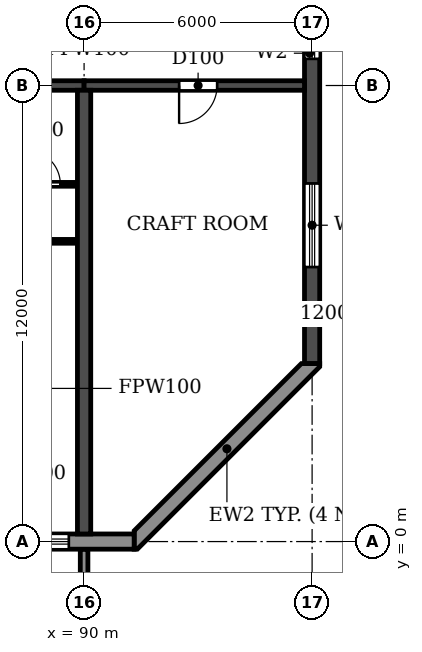
"""IFC4 building model, lengths in metres.
Left out: names, types, materials, properties, quantities, classifications, styles, units other than length and angle.
Written with IfcOpenShell. Run it as: python <this file> out.ifc"""

import sys

from ifc_helpers import new_model, si_unit, direction, frame, frame_2d, origin, place, context, subcontext, project, spatial, polyline, rectangle, outline, extrude, source, transform, mapped, element, fill, save


model = new_model("IFC4")
c1 = context("Model", 3, precision=1e-05, world=origin(), true_north=direction((0.0, 1.0)))
c2 = subcontext(c1, "Body", "Model", "MODEL_VIEW")
j1 = project(units=[si_unit("LENGTHUNIT", "METRE"), si_unit("PLANEANGLEUNIT", "RADIAN")], contexts=[c1])
p1 = place(None, origin())
s1 = spatial("IfcSite", under=j1, at=p1, CompositionType="ELEMENT")
p2 = place(p1, origin())
s2 = spatial("IfcBuilding", under=s1, at=p2, CompositionType="ELEMENT")
p3 = place(p2, frame((0.0, 0.0, 82.8)))
s3 = spatial("IfcBuildingStorey", under=s2, at=p3, CompositionType="ELEMENT", Elevation=82.8)
p4 = place(p3, frame((90.0, 0.2, 0.0), z_axis=(0.0, 0.0, 1.0), x_axis=(0.0, 1.0, 0.0)))
e1 = element("IfcWall", 1, at=p4, inside=s3, PredefinedType="SHEAR", context=c2, shape_type="SweptSolid", body=[
    extrude(rectangle(XDim=11.675, YDim=0.35, at=frame_2d((5.837, 0.0))), origin(), (0.0, 0.0, 1.0), 3.06),
])
p5 = place(p3, frame((96.0, 4.683, 0.0), z_axis=(0.0, 0.0, 1.0), x_axis=(0.0, 1.0, 0.0)))
e2 = element("IfcWall", 2, at=p5, inside=s3, PredefinedType="SHEAR", context=c2, shape_type="SweptSolid", body=[
    extrude(rectangle(XDim=34.234, YDim=0.4, at=frame_2d((17.117, 0.0))), origin(), (0.0, 0.0, 1.0), 3.06),
])
p6 = place(p5, frame((15.917, 0.0, 0.9)))
e3 = element("IfcOpeningElement", 3, at=p6, cuts=e2, PredefinedType="OPENING", context=c2, shape_type="SweptSolid", body=[
    extrude(rectangle(XDim=1.2, YDim=1.5, at=frame_2d((0.6, 0.75))), frame((0.0, 0.21, 0.0), z_axis=(0.0, -1.0, 0.0), x_axis=(1.0, 0.0, 0.0)), (0.0, 0.0, 1.0), 0.42),
])
p7 = place(p5, frame((23.817, 0.0, 0.9)))
e4 = element("IfcOpeningElement", 4, at=p7, cuts=e2, PredefinedType="OPENING", context=c2, shape_type="SweptSolid", body=[
    extrude(rectangle(XDim=1.2, YDim=1.5, at=frame_2d((0.6, 0.75))), frame((0.0, 0.21, 0.0), z_axis=(0.0, -1.0, 0.0), x_axis=(1.0, 0.0, 0.0)), (0.0, 0.0, 1.0), 0.42),
])
p8 = place(p5, frame((8.017, 0.0, 0.9)))
e5 = element("IfcOpeningElement", 5, at=p8, cuts=e2, PredefinedType="OPENING", context=c2, shape_type="SweptSolid", body=[
    extrude(rectangle(XDim=1.2, YDim=1.5, at=frame_2d((0.6, 0.75))), frame((0.0, 0.21, 0.0), z_axis=(0.0, -1.0, 0.0), x_axis=(1.0, 0.0, 0.0)), (0.0, 0.0, 1.0), 0.42),
])
p9 = place(p5, frame((28.894, 0.0, 0.6)))
e6 = element("IfcOpeningElement", 6, at=p9, cuts=e2, PredefinedType="OPENING", context=c2, shape_type="SweptSolid", body=[
    extrude(rectangle(XDim=2.2, YDim=1.8, at=frame_2d((1.1, 0.9))), frame((0.0, 0.21, 0.0), z_axis=(0.0, -1.0, 0.0), x_axis=(1.0, 0.0, 0.0)), (0.0, 0.0, 1.0), 0.42),
])
p10 = place(p5, frame((2.541, 0.0, 0.6)))
e7 = element("IfcOpeningElement", 7, at=p10, cuts=e2, PredefinedType="OPENING", context=c2, shape_type="SweptSolid", body=[
    extrude(rectangle(XDim=2.2, YDim=1.8, at=frame_2d((1.1, 0.9))), frame((0.0, 0.21, 0.0), z_axis=(0.0, -1.0, 0.0), x_axis=(1.0, 0.0, 0.0)), (0.0, 0.0, 1.0), 0.42),
])
p11 = place(p3, frame((84.0, 12.0, 0.0), z_axis=(0.0, 0.0, 1.0), x_axis=(1.0, 0.0, 0.0)))
e8 = element("IfcWall", 8, at=p11, inside=s3, PredefinedType="SHEAR", context=c2, shape_type="SweptSolid", body=[
    extrude(rectangle(XDim=6.0, YDim=0.25, at=frame_2d((3.0, 0.0))), origin(), (0.0, 0.0, 1.0), 2.46),
])
p12 = place(p11, frame((2.45, 0.0, 0.0)))
e9 = element("IfcOpeningElement", 9, at=p12, cuts=e8, PredefinedType="OPENING", context=c2, shape_type="SweptSolid", body=[
    extrude(rectangle(XDim=1.0, YDim=2.1, at=frame_2d((0.5, 1.05))), frame((0.0, 0.135, 0.0), z_axis=(0.0, -1.0, 0.0), x_axis=(1.0, 0.0, 0.0)), (0.0, 0.0, 1.0), 0.27),
])
p13 = place(p3, frame((90.0, 12.0, 0.0), z_axis=(0.0, 0.0, 1.0), x_axis=(1.0, 0.0, 0.0)))
e10 = element("IfcWall", 10, at=p13, inside=s3, PredefinedType="SHEAR", context=c2, shape_type="SweptSolid", body=[
    extrude(rectangle(XDim=5.8, YDim=0.25, at=frame_2d((2.9, 0.0))), origin(), (0.0, 0.0, 1.0), 2.46),
])
p14 = place(p13, frame((2.5, 0.0, 0.0)))
e11 = element("IfcOpeningElement", 11, at=p14, cuts=e10, PredefinedType="OPENING", context=c2, shape_type="SweptSolid", body=[
    extrude(rectangle(XDim=1.0, YDim=2.1, at=frame_2d((0.5, 1.05))), frame((0.0, 0.135, 0.0), z_axis=(0.0, -1.0, 0.0), x_axis=(1.0, 0.0, 0.0)), (0.0, 0.0, 1.0), 0.27),
])
p15 = place(p3, frame((10.683, 0.0, 0.0), z_axis=(0.0, 0.0, 1.0), x_axis=(1.0, 0.0, 0.0)))
e12 = element("IfcWall", 12, at=p15, inside=s3, PredefinedType="STANDARD", context=c2, shape_type="SweptSolid", body=[
    extrude(rectangle(XDim=80.634, YDim=0.4, at=frame_2d((40.317, 0.0))), origin(), (0.0, 0.0, 1.0), 3.06),
])
p16 = place(p15, frame((1.717, 0.0, 0.9)))
e13 = element("IfcOpeningElement", 13, at=p16, cuts=e12, PredefinedType="OPENING", context=c2, shape_type="SweptSolid", body=[
    extrude(rectangle(XDim=2.2, YDim=1.5, at=frame_2d((1.1, 0.75))), frame((0.0, 0.21, 0.0), z_axis=(0.0, -1.0, 0.0), x_axis=(1.0, 0.0, 0.0)), (0.0, 0.0, 1.0), 0.42),
])
p17 = place(p15, frame((4.917, 0.0, 0.0)))
e14 = element("IfcOpeningElement", 14, at=p17, cuts=e12, PredefinedType="OPENING", context=c2, shape_type="SweptSolid", body=[
    extrude(rectangle(XDim=1.8, YDim=2.4, at=frame_2d((0.9, 1.2))), frame((0.0, 0.21, 0.0), z_axis=(0.0, -1.0, 0.0), x_axis=(1.0, 0.0, 0.0)), (0.0, 0.0, 1.0), 0.42),
])
p18 = place(p15, frame((7.717, 0.0, 0.9)))
e15 = element("IfcOpeningElement", 15, at=p18, cuts=e12, PredefinedType="OPENING", context=c2, shape_type="SweptSolid", body=[
    extrude(rectangle(XDim=2.2, YDim=1.5, at=frame_2d((1.1, 0.75))), frame((0.0, 0.21, 0.0), z_axis=(0.0, -1.0, 0.0), x_axis=(1.0, 0.0, 0.0)), (0.0, 0.0, 1.0), 0.42),
])
p19 = place(p15, frame((10.717, 0.0, 0.9)))
e16 = element("IfcOpeningElement", 16, at=p19, cuts=e12, PredefinedType="OPENING", context=c2, shape_type="SweptSolid", body=[
    extrude(rectangle(XDim=2.2, YDim=1.5, at=frame_2d((1.1, 0.75))), frame((0.0, 0.21, 0.0), z_axis=(0.0, -1.0, 0.0), x_axis=(1.0, 0.0, 0.0)), (0.0, 0.0, 1.0), 0.42),
])
p20 = place(p15, frame((13.917, 0.0, 0.0)))
e17 = element("IfcOpeningElement", 17, at=p20, cuts=e12, PredefinedType="OPENING", context=c2, shape_type="SweptSolid", body=[
    extrude(rectangle(XDim=1.8, YDim=2.4, at=frame_2d((0.9, 1.2))), frame((0.0, 0.21, 0.0), z_axis=(0.0, -1.0, 0.0), x_axis=(1.0, 0.0, 0.0)), (0.0, 0.0, 1.0), 0.42),
])
p21 = place(p15, frame((16.717, 0.0, 0.9)))
e18 = element("IfcOpeningElement", 18, at=p21, cuts=e12, PredefinedType="OPENING", context=c2, shape_type="SweptSolid", body=[
    extrude(rectangle(XDim=2.2, YDim=1.5, at=frame_2d((1.1, 0.75))), frame((0.0, 0.21, 0.0), z_axis=(0.0, -1.0, 0.0), x_axis=(1.0, 0.0, 0.0)), (0.0, 0.0, 1.0), 0.42),
])
p22 = place(p15, frame((19.717, 0.0, 0.9)))
e19 = element("IfcOpeningElement", 19, at=p22, cuts=e12, PredefinedType="OPENING", context=c2, shape_type="SweptSolid", body=[
    extrude(rectangle(XDim=2.2, YDim=1.5, at=frame_2d((1.1, 0.75))), frame((0.0, 0.21, 0.0), z_axis=(0.0, -1.0, 0.0), x_axis=(1.0, 0.0, 0.0)), (0.0, 0.0, 1.0), 0.42),
])
p23 = place(p15, frame((22.717, 0.0, 0.9)))
e20 = element("IfcOpeningElement", 20, at=p23, cuts=e12, PredefinedType="OPENING", context=c2, shape_type="SweptSolid", body=[
    extrude(rectangle(XDim=2.2, YDim=1.5, at=frame_2d((1.1, 0.75))), frame((0.0, 0.21, 0.0), z_axis=(0.0, -1.0, 0.0), x_axis=(1.0, 0.0, 0.0)), (0.0, 0.0, 1.0), 0.42),
])
p24 = place(p15, frame((25.917, 0.0, 0.0)))
e21 = element("IfcOpeningElement", 21, at=p24, cuts=e12, PredefinedType="OPENING", context=c2, shape_type="SweptSolid", body=[
    extrude(rectangle(XDim=1.8, YDim=2.4, at=frame_2d((0.9, 1.2))), frame((0.0, 0.21, 0.0), z_axis=(0.0, -1.0, 0.0), x_axis=(1.0, 0.0, 0.0)), (0.0, 0.0, 1.0), 0.42),
])
p25 = place(p15, frame((28.717, 0.0, 0.9)))
e22 = element("IfcOpeningElement", 22, at=p25, cuts=e12, PredefinedType="OPENING", context=c2, shape_type="SweptSolid", body=[
    extrude(rectangle(XDim=2.2, YDim=1.5, at=frame_2d((1.1, 0.75))), frame((0.0, 0.21, 0.0), z_axis=(0.0, -1.0, 0.0), x_axis=(1.0, 0.0, 0.0)), (0.0, 0.0, 1.0), 0.42),
])
p26 = place(p15, frame((31.717, 0.0, 0.9)))
e23 = element("IfcOpeningElement", 23, at=p26, cuts=e12, PredefinedType="OPENING", context=c2, shape_type="SweptSolid", body=[
    extrude(rectangle(XDim=2.2, YDim=1.5, at=frame_2d((1.1, 0.75))), frame((0.0, 0.21, 0.0), z_axis=(0.0, -1.0, 0.0), x_axis=(1.0, 0.0, 0.0)), (0.0, 0.0, 1.0), 0.42),
])
p27 = place(p15, frame((34.717, 0.0, 0.9)))
e24 = element("IfcOpeningElement", 24, at=p27, cuts=e12, PredefinedType="OPENING", context=c2, shape_type="SweptSolid", body=[
    extrude(rectangle(XDim=2.2, YDim=1.5, at=frame_2d((1.1, 0.75))), frame((0.0, 0.21, 0.0), z_axis=(0.0, -1.0, 0.0), x_axis=(1.0, 0.0, 0.0)), (0.0, 0.0, 1.0), 0.42),
])
p28 = place(p15, frame((37.717, 0.0, 0.9)))
e25 = element("IfcOpeningElement", 25, at=p28, cuts=e12, PredefinedType="OPENING", context=c2, shape_type="SweptSolid", body=[
    extrude(rectangle(XDim=2.2, YDim=1.5, at=frame_2d((1.1, 0.75))), frame((0.0, 0.21, 0.0), z_axis=(0.0, -1.0, 0.0), x_axis=(1.0, 0.0, 0.0)), (0.0, 0.0, 1.0), 0.42),
])
p29 = place(p15, frame((40.917, 0.0, 0.0)))
e26 = element("IfcOpeningElement", 26, at=p29, cuts=e12, PredefinedType="OPENING", context=c2, shape_type="SweptSolid", body=[
    extrude(rectangle(XDim=1.8, YDim=2.4, at=frame_2d((0.9, 1.2))), frame((0.0, 0.21, 0.0), z_axis=(0.0, -1.0, 0.0), x_axis=(1.0, 0.0, 0.0)), (0.0, 0.0, 1.0), 0.42),
])
p30 = place(p15, frame((43.717, 0.0, 0.9)))
e27 = element("IfcOpeningElement", 27, at=p30, cuts=e12, PredefinedType="OPENING", context=c2, shape_type="SweptSolid", body=[
    extrude(rectangle(XDim=2.2, YDim=1.5, at=frame_2d((1.1, 0.75))), frame((0.0, 0.21, 0.0), z_axis=(0.0, -1.0, 0.0), x_axis=(1.0, 0.0, 0.0)), (0.0, 0.0, 1.0), 0.42),
])
p31 = place(p15, frame((46.717, 0.0, 0.9)))
e28 = element("IfcOpeningElement", 28, at=p31, cuts=e12, PredefinedType="OPENING", context=c2, shape_type="SweptSolid", body=[
    extrude(rectangle(XDim=2.2, YDim=1.5, at=frame_2d((1.1, 0.75))), frame((0.0, 0.21, 0.0), z_axis=(0.0, -1.0, 0.0), x_axis=(1.0, 0.0, 0.0)), (0.0, 0.0, 1.0), 0.42),
])
p32 = place(p15, frame((49.717, 0.0, 0.9)))
e29 = element("IfcOpeningElement", 29, at=p32, cuts=e12, PredefinedType="OPENING", context=c2, shape_type="SweptSolid", body=[
    extrude(rectangle(XDim=2.2, YDim=1.5, at=frame_2d((1.1, 0.75))), frame((0.0, 0.21, 0.0), z_axis=(0.0, -1.0, 0.0), x_axis=(1.0, 0.0, 0.0)), (0.0, 0.0, 1.0), 0.42),
])
p33 = place(p15, frame((52.917, 0.0, 0.0)))
e30 = element("IfcOpeningElement", 30, at=p33, cuts=e12, PredefinedType="OPENING", context=c2, shape_type="SweptSolid", body=[
    extrude(rectangle(XDim=1.8, YDim=2.4, at=frame_2d((0.9, 1.2))), frame((0.0, 0.21, 0.0), z_axis=(0.0, -1.0, 0.0), x_axis=(1.0, 0.0, 0.0)), (0.0, 0.0, 1.0), 0.42),
])
p34 = place(p15, frame((55.717, 0.0, 0.9)))
e31 = element("IfcOpeningElement", 31, at=p34, cuts=e12, PredefinedType="OPENING", context=c2, shape_type="SweptSolid", body=[
    extrude(rectangle(XDim=2.2, YDim=1.5, at=frame_2d((1.1, 0.75))), frame((0.0, 0.21, 0.0), z_axis=(0.0, -1.0, 0.0), x_axis=(1.0, 0.0, 0.0)), (0.0, 0.0, 1.0), 0.42),
])
p35 = place(p15, frame((58.717, 0.0, 0.9)))
e32 = element("IfcOpeningElement", 32, at=p35, cuts=e12, PredefinedType="OPENING", context=c2, shape_type="SweptSolid", body=[
    extrude(rectangle(XDim=2.2, YDim=1.5, at=frame_2d((1.1, 0.75))), frame((0.0, 0.21, 0.0), z_axis=(0.0, -1.0, 0.0), x_axis=(1.0, 0.0, 0.0)), (0.0, 0.0, 1.0), 0.42),
])
p36 = place(p15, frame((61.717, 0.0, 0.9)))
e33 = element("IfcOpeningElement", 33, at=p36, cuts=e12, PredefinedType="OPENING", context=c2, shape_type="SweptSolid", body=[
    extrude(rectangle(XDim=2.2, YDim=1.5, at=frame_2d((1.1, 0.75))), frame((0.0, 0.21, 0.0), z_axis=(0.0, -1.0, 0.0), x_axis=(1.0, 0.0, 0.0)), (0.0, 0.0, 1.0), 0.42),
])
p37 = place(p15, frame((64.917, 0.0, 0.0)))
e34 = element("IfcOpeningElement", 34, at=p37, cuts=e12, PredefinedType="OPENING", context=c2, shape_type="SweptSolid", body=[
    extrude(rectangle(XDim=1.8, YDim=2.4, at=frame_2d((0.9, 1.2))), frame((0.0, 0.21, 0.0), z_axis=(0.0, -1.0, 0.0), x_axis=(1.0, 0.0, 0.0)), (0.0, 0.0, 1.0), 0.42),
])
p38 = place(p15, frame((67.717, 0.0, 0.9)))
e35 = element("IfcOpeningElement", 35, at=p38, cuts=e12, PredefinedType="OPENING", context=c2, shape_type="SweptSolid", body=[
    extrude(rectangle(XDim=2.2, YDim=1.5, at=frame_2d((1.1, 0.75))), frame((0.0, 0.21, 0.0), z_axis=(0.0, -1.0, 0.0), x_axis=(1.0, 0.0, 0.0)), (0.0, 0.0, 1.0), 0.42),
])
p39 = place(p15, frame((70.717, 0.0, 0.9)))
e36 = element("IfcOpeningElement", 36, at=p39, cuts=e12, PredefinedType="OPENING", context=c2, shape_type="SweptSolid", body=[
    extrude(rectangle(XDim=2.2, YDim=1.5, at=frame_2d((1.1, 0.75))), frame((0.0, 0.21, 0.0), z_axis=(0.0, -1.0, 0.0), x_axis=(1.0, 0.0, 0.0)), (0.0, 0.0, 1.0), 0.42),
])
p40 = place(p15, frame((73.917, 0.0, 0.0)))
e37 = element("IfcOpeningElement", 37, at=p40, cuts=e12, PredefinedType="OPENING", context=c2, shape_type="SweptSolid", body=[
    extrude(rectangle(XDim=1.8, YDim=2.4, at=frame_2d((0.9, 1.2))), frame((0.0, 0.21, 0.0), z_axis=(0.0, -1.0, 0.0), x_axis=(1.0, 0.0, 0.0)), (0.0, 0.0, 1.0), 0.42),
])
p41 = place(p15, frame((76.717, 0.0, 0.9)))
e38 = element("IfcOpeningElement", 38, at=p41, cuts=e12, PredefinedType="OPENING", context=c2, shape_type="SweptSolid", body=[
    extrude(rectangle(XDim=2.2, YDim=1.5, at=frame_2d((1.1, 0.75))), frame((0.0, 0.21, 0.0), z_axis=(0.0, -1.0, 0.0), x_axis=(1.0, 0.0, 0.0)), (0.0, 0.0, 1.0), 0.42),
])
p42 = place(p3, origin())
e39 = element("IfcWall", 39, at=p42, inside=s3, PredefinedType="STANDARD", context=c2, shape_type="SweptSolid", body=[
    extrude(outline(polyline([(91.317, -0.2), (91.4, -0.2), (96.2, 4.6), (96.2, 4.683), (95.717, 4.683), (91.317, 0.283), (91.317, -0.2)])), origin(), (0.0, 0.0, 1.0), 3.06),
])
m1 = source(origin(), c2, "Body", "SweptSolid", [
    extrude(outline(polyline([(0.0, 0.0), (0.2, 0.0), (0.2, 1.65), (0.0, 1.65), (0.0, 0.0)])), origin(), (0.0, 0.0, 1.0), 3.1),
])
p43 = place(p3, frame((89.9, -1.85, 0.0)))
e40 = element("IfcWall", 40, at=p43, inside=s3, PredefinedType="STANDARD", context=c2, shape_type="MappedRepresentation", body=[
    mapped(m1, transform((0.0, 0.0, 0.0))),
])
p44 = place(p3, frame((86.95, 7.9, 0.0), z_axis=(0.0, 0.0, 1.0), x_axis=(1.0, 0.0, 0.0)))
e41 = element("IfcWall", 41, at=p44, inside=s3, PredefinedType="PARTITIONING", context=c2, shape_type="SweptSolid", body=[
    extrude(rectangle(XDim=2.865, YDim=0.1, at=frame_2d((1.433, 0.0))), origin(), (0.0, 0.0, 1.0), 3.06),
])
p45 = place(p44, frame((0.55, 0.0, 0.0)))
e42 = element("IfcOpeningElement", 42, at=p45, cuts=e41, PredefinedType="OPENING", context=c2, shape_type="SweptSolid", body=[
    extrude(rectangle(XDim=0.9, YDim=2.1, at=frame_2d((0.45, 1.05))), frame((0.0, 0.06, 0.0), z_axis=(0.0, -1.0, 0.0), x_axis=(1.0, 0.0, 0.0)), (0.0, 0.0, 1.0), 0.12),
])
p46 = place(p3, frame((87.8, 9.4, 0.0), z_axis=(0.0, 0.0, 1.0), x_axis=(1.0, 0.0, 0.0)))
e43 = element("IfcWall", 43, at=p46, inside=s3, PredefinedType="PARTITIONING", context=c2, shape_type="SweptSolid", body=[
    extrude(rectangle(XDim=2.015, YDim=0.1, at=frame_2d((1.007, 0.0))), origin(), (0.0, 0.0, 1.0), 3.06),
])
p47 = place(p46, frame((0.675, 0.0, 0.0)))
e44 = element("IfcOpeningElement", 44, at=p47, cuts=e43, PredefinedType="OPENING", context=c2, shape_type="SweptSolid", body=[
    extrude(rectangle(XDim=0.9, YDim=2.1, at=frame_2d((0.45, 1.05))), frame((0.0, 0.06, 0.0), z_axis=(0.0, -1.0, 0.0), x_axis=(1.0, 0.0, 0.0)), (0.0, 0.0, 1.0), 0.12),
])
p48 = place(p41, origin())
e45 = element("IfcWindow", 45, at=p48, inside=s3, PartitioningType="DOUBLE_PANEL_HORIZONTAL", PredefinedType="WINDOW", context=c2, shape_type="SweptSolid", body=[
    extrude(rectangle(XDim=2.2, YDim=1.5, at=frame_2d((1.1, 0.75))), frame((0.0, 0.03, 0.0), z_axis=(0.0, -1.0, 0.0), x_axis=(1.0, 0.0, 0.0)), (0.0, 0.0, 1.0), 0.06),
])
fill(e38, e45)
p49 = place(p8, origin())
e46 = element("IfcWindow", 46, at=p49, inside=s3, PartitioningType="SINGLE_PANEL", PredefinedType="WINDOW", context=c2, shape_type="SweptSolid", body=[
    extrude(rectangle(XDim=1.2, YDim=1.5, at=frame_2d((0.6, 0.75))), frame((0.0, 0.03, 0.0), z_axis=(0.0, -1.0, 0.0), x_axis=(1.0, 0.0, 0.0)), (0.0, 0.0, 1.0), 0.06),
])
fill(e5, e46)
p50 = place(p10, origin())
e47 = element("IfcWindow", 47, at=p50, inside=s3, PartitioningType="DOUBLE_PANEL_HORIZONTAL", PredefinedType="WINDOW", context=c2, shape_type="SweptSolid", body=[
    extrude(rectangle(XDim=2.2, YDim=1.8, at=frame_2d((1.1, 0.9))), frame((0.0, 0.03, 0.0), z_axis=(0.0, -1.0, 0.0), x_axis=(1.0, 0.0, 0.0)), (0.0, 0.0, 1.0), 0.06),
])
fill(e7, e47)
p51 = place(p47, origin())
e48 = element("IfcDoor", 48, at=p51, inside=s3, OperationType="SINGLE_SWING_LEFT", PredefinedType="DOOR", context=c2, shape_type="SweptSolid", body=[
    extrude(rectangle(XDim=0.9, YDim=2.1, at=frame_2d((0.45, 1.05))), frame((0.0, 0.025, 0.0), z_axis=(0.0, -1.0, 0.0), x_axis=(1.0, 0.0, 0.0)), (0.0, 0.0, 1.0), 0.05),
])
fill(e44, e48)
p52 = place(p14, frame((1.0, 0.0, 0.0), z_axis=(0.0, 0.0, 1.0), x_axis=(-1.0, 0.0, 0.0)))
e49 = element("IfcDoor", 49, at=p52, inside=s3, OperationType="SINGLE_SWING_RIGHT", PredefinedType="DOOR", context=c2, shape_type="SweptSolid", body=[
    extrude(rectangle(XDim=1.0, YDim=2.1, at=frame_2d((0.5, 1.05))), frame((0.0, 0.025, 0.0), z_axis=(0.0, -1.0, 0.0), x_axis=(1.0, 0.0, 0.0)), (0.0, 0.0, 1.0), 0.05),
])
fill(e11, e49)
save(model, sys.argv[1])
